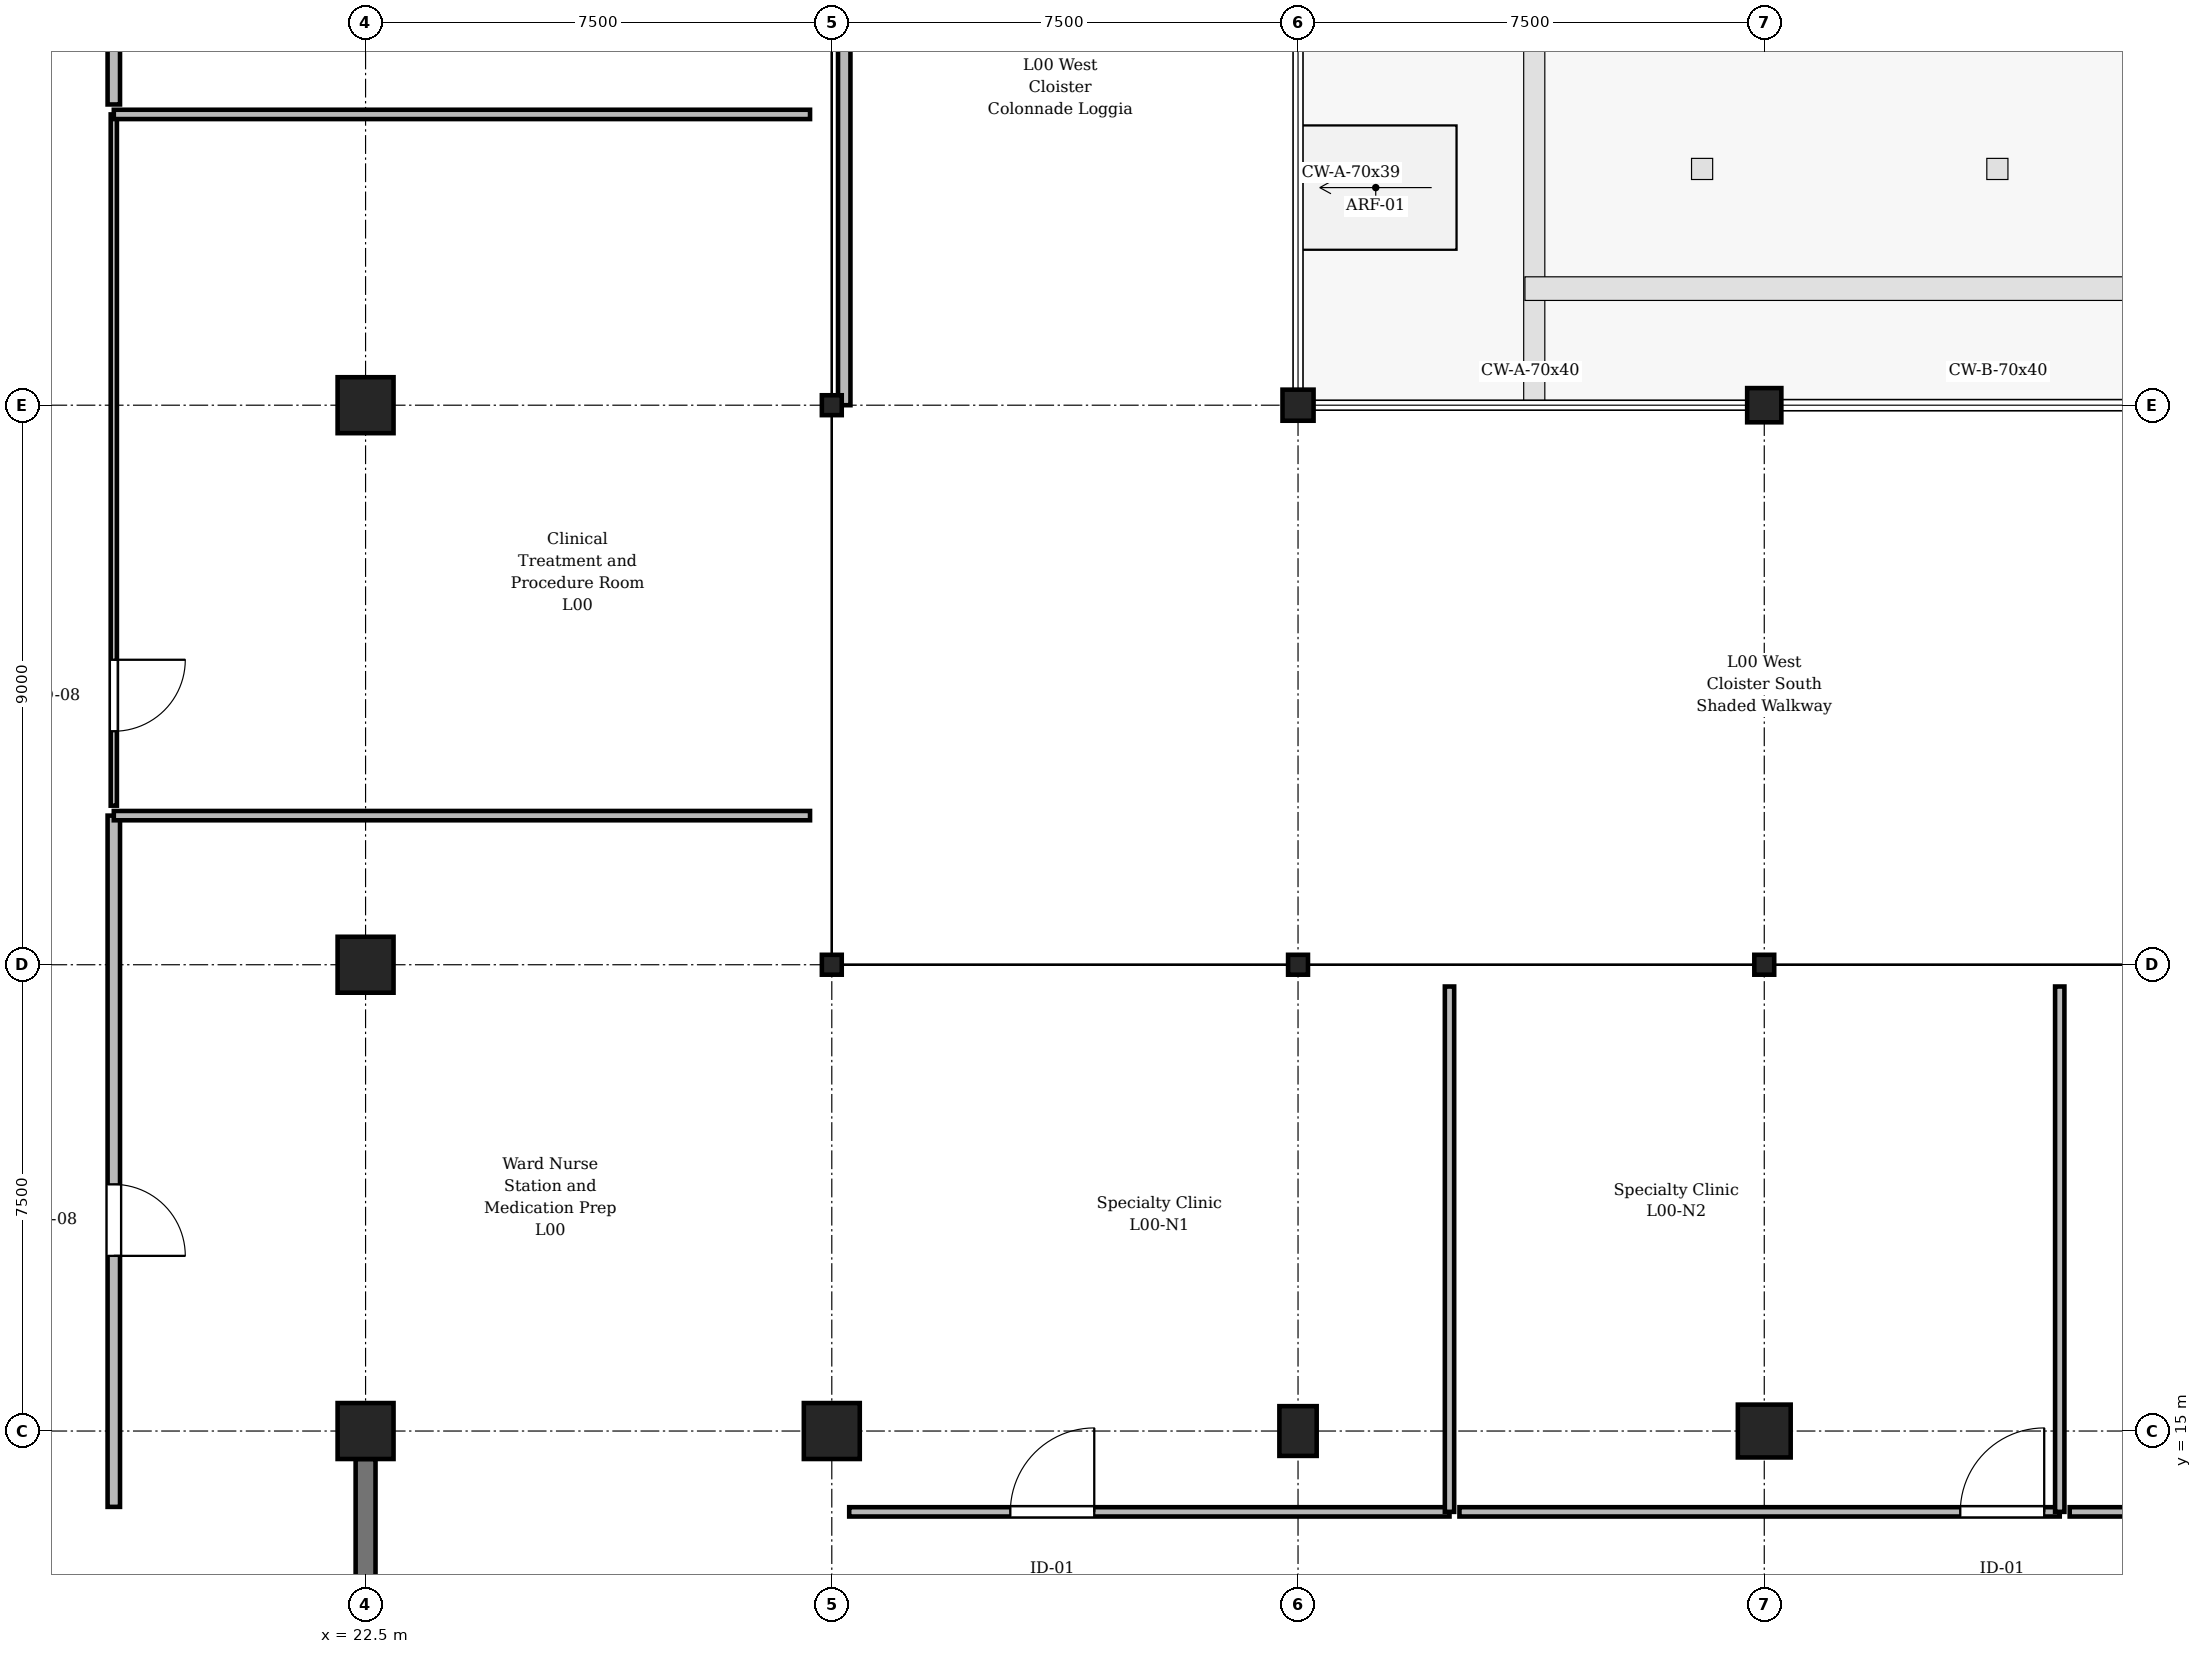
"""IFC4 building model, lengths in metres.
Left out: names, types, materials, properties, quantities, classifications, styles, units other than length and angle.
Written with IfcOpenShell. Run it as: python <this file> out.ifc"""

import sys

from ifc_helpers import new_model, si_unit, direction, frame, frame_2d, origin, origin_2d, place, context, subcontext, project, spatial, rectangle, circle, extrude, element, fill, save


model = new_model("IFC4")
c1 = context("Model", 3, precision=1e-05, world=origin(), true_north=direction((0.0, 1.0)))
c2 = subcontext(c1, "Body", "Model", "MODEL_VIEW")
j1 = project(units=[si_unit("LENGTHUNIT", "METRE"), si_unit("PLANEANGLEUNIT", "RADIAN")], contexts=[c1])
p1 = place(None, origin())
s1 = spatial("IfcSite", under=j1, at=p1, CompositionType="ELEMENT")
p2 = place(p1, origin())
s2 = spatial("IfcBuilding", under=s1, at=p2, CompositionType="ELEMENT")
p3 = place(p2, origin())
s3 = spatial("IfcBuildingStorey", under=s2, at=p3, CompositionType="ELEMENT", Elevation=0.0)
p4 = place(p3, frame((22.5, 15.0, 0.0), z_axis=(0.0, 0.0, 1.0), x_axis=(1.0, 0.0, 0.0)))
e1 = element("IfcColumn", 1, at=p4, inside=s3, PredefinedType="COLUMN", context=c2, shape_type="SweptSolid", body=[
    extrude(rectangle(XDim=0.9, YDim=0.9, at=origin_2d()), origin(), (0.0, 0.0, 1.0), 4.8),
])
p5 = place(p3, frame((22.5, 22.5, 0.0), z_axis=(0.0, 0.0, 1.0), x_axis=(1.0, 0.0, 0.0)))
e2 = element("IfcColumn", 2, at=p5, inside=s3, PredefinedType="COLUMN", context=c2, shape_type="SweptSolid", body=[
    extrude(circle(Radius=0.45, at=origin_2d()), origin(), (0.0, 0.0, 1.0), 4.8),
])
p6 = place(p3, frame((22.5, 31.5, 0.0), z_axis=(0.0, 0.0, 1.0), x_axis=(1.0, 0.0, 0.0)))
e3 = element("IfcColumn", 3, at=p6, inside=s3, PredefinedType="COLUMN", context=c2, shape_type="SweptSolid", body=[
    extrude(rectangle(XDim=0.9, YDim=0.9, at=origin_2d()), origin(), (0.0, 0.0, 1.0), 4.8),
])
p7 = place(p3, frame((30.0, 15.0, 0.0), z_axis=(0.0, 0.0, 1.0), x_axis=(1.0, 0.0, 0.0)))
e4 = element("IfcColumn", 4, at=p7, inside=s3, PredefinedType="COLUMN", context=c2, shape_type="SweptSolid", body=[
    extrude(circle(Radius=0.45, at=origin_2d()), origin(), (0.0, 0.0, 1.0), 4.8),
])
for number, where, z_axis, x_axis in (
    (5, (30.0, 22.5, 0.0), (0.0, 0.0, 1.0), (1.0, 0.0, 0.0)),
    (6, (30.0, 31.5, 0.0), (0.0, 0.0, 1.0), (1.0, 0.0, 0.0)),
):
    element("IfcColumn", number, at=place(p3, frame(where, z_axis=z_axis, x_axis=x_axis)), inside=s3, PredefinedType="COLUMN", context=c2, shape_type="SweptSolid", body=[
        extrude(rectangle(XDim=0.32, YDim=0.32, at=origin_2d()), origin(), (0.0, 0.0, 1.0), 4.8),
    ])
p8 = place(p3, frame((37.5, 15.0, 0.0), z_axis=(0.0, 0.0, 1.0), x_axis=(1.0, 0.0, 0.0)))
e7 = element("IfcColumn", 7, at=p8, inside=s3, PredefinedType="COLUMN", context=c2, shape_type="SweptSolid", body=[
    extrude(rectangle(XDim=0.6, YDim=0.8, at=origin_2d()), origin(), (0.0, 0.0, 1.0), 4.8),
])
p9 = place(p3, frame((37.5, 22.5, 0.0), z_axis=(0.0, 0.0, 1.0), x_axis=(1.0, 0.0, 0.0)))
e8 = element("IfcColumn", 8, at=p9, inside=s3, PredefinedType="COLUMN", context=c2, shape_type="SweptSolid", body=[
    extrude(rectangle(XDim=0.32, YDim=0.32, at=origin_2d()), origin(), (0.0, 0.0, 1.0), 4.8),
])
p10 = place(p3, frame((37.5, 31.5, 0.0), z_axis=(0.0, 0.0, 1.0), x_axis=(1.0, 0.0, 0.0)))
e9 = element("IfcColumn", 9, at=p10, inside=s3, PredefinedType="COLUMN", context=c2, shape_type="SweptSolid", body=[
    extrude(rectangle(XDim=0.5, YDim=0.5, at=origin_2d()), origin(), (0.0, 0.0, 1.0), 4.8),
])
p11 = place(p3, frame((45.0, 15.0, 0.0), z_axis=(0.0, 0.0, 1.0), x_axis=(1.0, 0.0, 0.0)))
e10 = element("IfcColumn", 10, at=p11, inside=s3, PredefinedType="COLUMN", context=c2, shape_type="SweptSolid", body=[
    extrude(rectangle(XDim=0.85, YDim=0.85, at=origin_2d()), origin(), (0.0, 0.0, 1.0), 4.8),
])
p12 = place(p3, frame((45.0, 22.5, 0.0), z_axis=(0.0, 0.0, 1.0), x_axis=(1.0, 0.0, 0.0)))
e11 = element("IfcColumn", 11, at=p12, inside=s3, PredefinedType="COLUMN", context=c2, shape_type="SweptSolid", body=[
    extrude(rectangle(XDim=0.32, YDim=0.32, at=origin_2d()), origin(), (0.0, 0.0, 1.0), 4.8),
])
p13 = place(p3, frame((45.0, 31.5, 0.0), z_axis=(0.0, 0.0, 1.0), x_axis=(1.0, 0.0, 0.0)))
e12 = element("IfcColumn", 12, at=p13, inside=s3, PredefinedType="COLUMN", context=c2, shape_type="SweptSolid", body=[
    extrude(rectangle(XDim=0.55, YDim=0.55, at=origin_2d()), origin(), (0.0, 0.0, 1.0), 4.8),
])
p14 = place(p3, frame((22.5, 7.95, 0.0), z_axis=(0.0, 0.0, 1.0), x_axis=(0.0, 1.0, 0.0)))
e13 = element("IfcWall", 13, at=p14, inside=s3, PredefinedType="SHEAR", context=c2, shape_type="SweptSolid", body=[
    extrude(rectangle(XDim=6.6, YDim=0.32, at=frame_2d((3.3, 0.0))), origin(), (0.0, 0.0, 1.0), 3.95),
])
p15 = place(p3, frame((18.45, 24.899, 0.0), z_axis=(0.0, 0.0, 1.0), x_axis=(0.0, -1.0, 0.0)))
e14 = element("IfcWall", 14, at=p15, inside=s3, PredefinedType="STANDARD", context=c2, shape_type="SweptSolid", body=[
    extrude(rectangle(XDim=11.119, YDim=0.2, at=frame_2d((5.559, 0.0))), origin(), (0.0, 0.0, 1.0), 4.085),
])
p16 = place(p15, frame((5.931, 0.0, 0.0)))
e15 = element("IfcOpeningElement", 15, at=p16, cuts=e14, PredefinedType="OPENING", context=c2, shape_type="SweptSolid", body=[
    extrude(rectangle(XDim=1.15, YDim=2.2, at=frame_2d((0.575, 1.1))), frame((0.0, 0.11, 0.0), z_axis=(0.0, -1.0, 0.0), x_axis=(1.0, 0.0, 0.0)), (0.0, 0.0, 1.0), 0.22),
])
p17 = place(p3, frame((18.45, 36.177, 0.0), z_axis=(0.0, 0.0, 1.0), x_axis=(0.0, -1.0, 0.0)))
e16 = element("IfcWall", 16, at=p17, inside=s3, PredefinedType="PARTITIONING", context=c2, shape_type="SweptSolid", body=[
    extrude(rectangle(XDim=11.118, YDim=0.1, at=frame_2d((5.559, 0.0))), origin(), (0.0, 0.0, 1.0), 4.085),
])
p18 = place(p17, frame((8.771, 0.0, 0.0)))
e17 = element("IfcOpeningElement", 17, at=p18, cuts=e16, PredefinedType="OPENING", context=c2, shape_type="SweptSolid", body=[
    extrude(rectangle(XDim=1.15, YDim=2.2, at=frame_2d((0.575, 1.1))), frame((0.0, 0.06, 0.0), z_axis=(0.0, -1.0, 0.0), x_axis=(1.0, 0.0, 0.0)), (0.0, 0.0, 1.0), 0.12),
])
p19 = place(p3, frame((18.45, 47.456, 0.0), z_axis=(0.0, 0.0, 1.0), x_axis=(0.0, -1.0, 0.0)))
e18 = element("IfcWall", 18, at=p19, inside=s3, PredefinedType="STANDARD", context=c2, shape_type="SweptSolid", body=[
    extrude(rectangle(XDim=11.119, YDim=0.2, at=frame_2d((5.559, 0.0))), origin(), (0.0, 0.0, 1.0), 4.485),
])
p20 = place(p19, frame((4.077, 0.0, 0.0)))
e19 = element("IfcOpeningElement", 19, at=p20, cuts=e18, PredefinedType="OPENING", context=c2, shape_type="SweptSolid", body=[
    extrude(rectangle(XDim=1.05, YDim=2.2, at=frame_2d((0.525, 1.1))), frame((0.0, 0.11, 0.0), z_axis=(0.0, -1.0, 0.0), x_axis=(1.0, 0.0, 0.0)), (0.0, 0.0, 1.0), 0.22),
])
p21 = place(p3, frame((30.28, 13.7, 0.0), z_axis=(0.0, 0.0, 1.0), x_axis=(1.0, 0.0, 0.0)))
e20 = element("IfcWall", 20, at=p21, inside=s3, PredefinedType="PARTITIONING", context=c2, shape_type="SweptSolid", body=[
    extrude(rectangle(XDim=9.657, YDim=0.15, at=frame_2d((4.828, 0.0))), origin(), (0.0, 0.0, 1.0), 4.485),
])
p22 = place(p21, frame((2.592, 0.0, 0.0)))
e21 = element("IfcOpeningElement", 21, at=p22, cuts=e20, PredefinedType="OPENING", context=c2, shape_type="SweptSolid", body=[
    extrude(rectangle(XDim=1.35, YDim=2.25, at=frame_2d((0.675, 1.125))), frame((0.0, 0.085, 0.0), z_axis=(0.0, -1.0, 0.0), x_axis=(1.0, 0.0, 0.0)), (0.0, 0.0, 1.0), 0.17),
])
p23 = place(p3, frame((40.097, 13.7, 0.0), z_axis=(0.0, 0.0, 1.0), x_axis=(1.0, 0.0, 0.0)))
e22 = element("IfcWall", 22, at=p23, inside=s3, PredefinedType="PARTITIONING", context=c2, shape_type="SweptSolid", body=[
    extrude(rectangle(XDim=9.657, YDim=0.15, at=frame_2d((4.828, 0.0))), origin(), (0.0, 0.0, 1.0), 4.485),
])
p24 = place(p23, frame((8.057, 0.0, 0.0)))
e23 = element("IfcOpeningElement", 23, at=p24, cuts=e22, PredefinedType="OPENING", context=c2, shape_type="SweptSolid", body=[
    extrude(rectangle(XDim=1.35, YDim=2.25, at=frame_2d((0.675, 1.125))), frame((0.0, 0.085, 0.0), z_axis=(0.0, -1.0, 0.0), x_axis=(1.0, 0.0, 0.0)), (0.0, 0.0, 1.0), 0.17),
])
p25 = place(p3, frame((49.913, 13.7, 0.0), z_axis=(0.0, 0.0, 1.0), x_axis=(1.0, 0.0, 0.0)))
e24 = element("IfcWall", 24, at=p25, inside=s3, PredefinedType="PARTITIONING", context=c2, shape_type="SweptSolid", body=[
    extrude(rectangle(XDim=9.657, YDim=0.15, at=frame_2d((4.828, 0.0))), origin(), (0.0, 0.0, 1.0), 4.485),
])
p26 = place(p25, frame((5.715, 0.0, 0.0)))
e25 = element("IfcOpeningElement", 25, at=p26, cuts=e24, PredefinedType="OPENING", context=c2, shape_type="SweptSolid", body=[
    extrude(rectangle(XDim=1.35, YDim=2.25, at=frame_2d((0.675, 1.125))), frame((0.0, 0.085, 0.0), z_axis=(0.0, -1.0, 0.0), x_axis=(1.0, 0.0, 0.0)), (0.0, 0.0, 1.0), 0.17),
])
p27 = place(p3, frame((30.2, 76.15, 0.0), z_axis=(0.0, 0.0, 1.0), x_axis=(0.0, -1.0, 0.0)))
e26 = element("IfcWall", 26, at=p27, inside=s3, PredefinedType="STANDARD", context=c2, shape_type="SweptSolid", body=[
    extrude(rectangle(XDim=44.65, YDim=0.2, at=frame_2d((22.325, 0.0))), origin(), (0.0, 0.0, 1.0), 3.935),
])
p28 = place(p27, frame((17.49, 0.0, 0.0)))
e27 = element("IfcOpeningElement", 27, at=p28, cuts=e26, PredefinedType="OPENING", context=c2, shape_type="SweptSolid", body=[
    extrude(rectangle(XDim=1.05, YDim=2.2, at=frame_2d((0.525, 1.1))), frame((0.0, 0.11, 0.0), z_axis=(0.0, -1.0, 0.0), x_axis=(1.0, 0.0, 0.0)), (0.0, 0.0, 1.0), 0.22),
])
for number, where, z_axis, x_axis in (
    (28, (18.45, 24.899, 0.0), (0.0, 0.0, 1.0), (1.0, 0.0, 0.0)),
    (29, (18.45, 36.177, 0.0), (0.0, 0.0, 1.0), (1.0, 0.0, 0.0)),
):
    element("IfcWall", number, at=place(p3, frame(where, z_axis=z_axis, x_axis=x_axis)), inside=s3, PredefinedType="PARTITIONING", context=c2, shape_type="SweptSolid", body=[
        extrude(rectangle(XDim=11.2, YDim=0.15, at=frame_2d((5.6, 0.0))), origin(), (0.0, 0.0, 1.0), 4.485),
    ])
for number, where, z_axis, x_axis in (
    (30, (39.937, 13.7, 0.0), (0.0, 0.0, 1.0), (0.0, 1.0, 0.0)),
    (31, (49.753, 13.7, 0.0), (0.0, 0.0, 1.0), (0.0, 1.0, 0.0)),
):
    element("IfcWall", number, at=place(p3, frame(where, z_axis=z_axis, x_axis=x_axis)), inside=s3, PredefinedType="PARTITIONING", context=c2, shape_type="SweptSolid", body=[
        extrude(rectangle(XDim=8.45, YDim=0.15, at=frame_2d((4.225, 0.0))), origin(), (0.0, 0.0, 1.0), 4.485),
    ])
p29 = place(p16, origin())
e32 = element("IfcDoor", 32, at=p29, inside=s3, OperationType="SINGLE_SWING_RIGHT", PredefinedType="DOOR", context=c2, shape_type="SweptSolid", body=[
    extrude(rectangle(XDim=1.15, YDim=2.2, at=frame_2d((0.575, 1.1))), frame((0.0, 0.025, 0.0), z_axis=(0.0, -1.0, 0.0), x_axis=(1.0, 0.0, 0.0)), (0.0, 0.0, 1.0), 0.05),
])
fill(e15, e32)
p30 = place(p18, origin())
e33 = element("IfcDoor", 33, at=p30, inside=s3, OperationType="SINGLE_SWING_LEFT", PredefinedType="DOOR", context=c2, shape_type="SweptSolid", body=[
    extrude(rectangle(XDim=1.15, YDim=2.2, at=frame_2d((0.575, 1.1))), frame((0.0, 0.025, 0.0), z_axis=(0.0, -1.0, 0.0), x_axis=(1.0, 0.0, 0.0)), (0.0, 0.0, 1.0), 0.05),
])
fill(e17, e33)
p31 = place(p22, origin())
e34 = element("IfcDoor", 34, at=p31, inside=s3, OperationType="SINGLE_SWING_RIGHT", PredefinedType="DOOR", context=c2, shape_type="SweptSolid", body=[
    extrude(rectangle(XDim=1.35, YDim=2.25, at=frame_2d((0.675, 1.125))), frame((0.0, 0.025, 0.0), z_axis=(0.0, -1.0, 0.0), x_axis=(1.0, 0.0, 0.0)), (0.0, 0.0, 1.0), 0.05),
])
fill(e21, e34)
p32 = place(p24, origin())
e35 = element("IfcDoor", 35, at=p32, inside=s3, OperationType="SINGLE_SWING_RIGHT", PredefinedType="DOOR", context=c2, shape_type="SweptSolid", body=[
    extrude(rectangle(XDim=1.35, YDim=2.25, at=frame_2d((0.675, 1.125))), frame((0.0, 0.025, 0.0), z_axis=(0.0, -1.0, 0.0), x_axis=(1.0, 0.0, 0.0)), (0.0, 0.0, 1.0), 0.05),
])
fill(e23, e35)
save(model, sys.argv[1])
